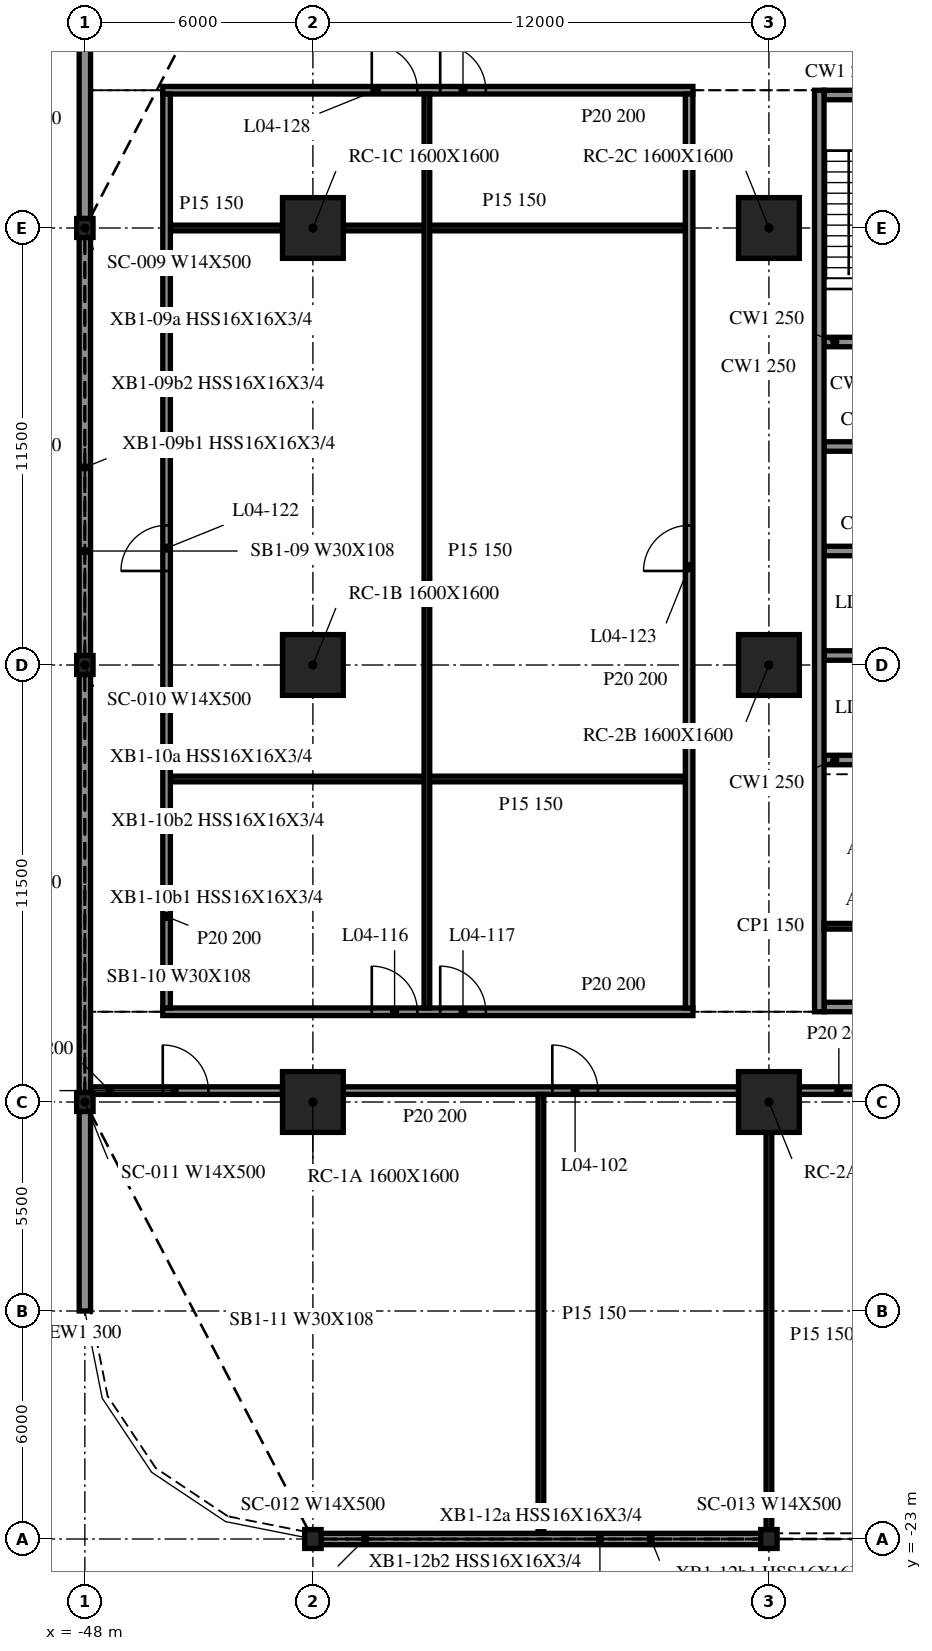
"""IFC4 building model, lengths in metres.
Left out: names, types, materials, properties, quantities, classifications, styles, units other than length and angle.
Written with IfcOpenShell. Run it as: python <this file> out.ifc"""

import sys

from ifc_helpers import new_model, si_unit, direction, frame, frame_2d, origin, origin_2d, place, context, subcontext, project, spatial, rectangle, i_section, extrude, element, fill, save


model = new_model("IFC4")
c1 = context("Model", 3, precision=1e-05, world=origin(), true_north=direction((0.0, 1.0)))
c2 = subcontext(c1, "Body", "Model", "MODEL_VIEW")
j1 = project(units=[si_unit("LENGTHUNIT", "METRE"), si_unit("PLANEANGLEUNIT", "RADIAN")], contexts=[c1])
p1 = place(None, origin())
s1 = spatial("IfcSite", under=j1, at=p1, CompositionType="ELEMENT")
p2 = place(p1, origin())
s2 = spatial("IfcBuilding", under=s1, at=p2, CompositionType="ELEMENT")
p3 = place(p2, frame((0.0, 0.0, 20.1)))
s3 = spatial("IfcBuildingStorey", under=s2, at=p3, CompositionType="ELEMENT", Elevation=20.1)
for number, where, z_axis, x_axis in (
    (1, (-42.0, -11.5, -0.34), (0.0, 0.0, 1.0), (1.0, 0.0, 0.0)),
    (2, (-42.0, 0.0, -0.34), (0.0, 0.0, 1.0), (1.0, 0.0, 0.0)),
    (3, (-42.0, 11.5, -0.34), (0.0, 0.0, 1.0), (1.0, 0.0, 0.0)),
    (4, (-30.0, -11.5, -0.34), (0.0, 0.0, 1.0), (1.0, 0.0, 0.0)),
    (5, (-30.0, 0.0, -0.34), (0.0, 0.0, 1.0), (1.0, 0.0, 0.0)),
    (6, (-30.0, 11.5, -0.34), (0.0, 0.0, 1.0), (1.0, 0.0, 0.0)),
):
    element("IfcColumn", number, at=place(p3, frame(where, z_axis=z_axis, x_axis=x_axis)), inside=s3, PredefinedType="COLUMN", context=c2, shape_type="SweptSolid", body=[
        extrude(rectangle(XDim=1.6, YDim=1.6, at=origin_2d()), origin(), (0.0, 0.0, 1.0), 4.3),
    ])
for number, where, z_axis, x_axis in (
    (7, (-48.0, 11.5, -0.34), (0.0, 0.0, 1.0), (1.0, 0.0, 0.0)),
    (8, (-48.0, 0.0, -0.34), (0.0, 0.0, 1.0), (1.0, 0.0, 0.0)),
    (9, (-48.0, -11.5, -0.34), (0.0, 0.0, 1.0), (1.0, 0.0, 0.0)),
    (10, (-42.0, -23.0, -0.34), (0.0, 0.0, 1.0), (1.0, 0.0, 0.0)),
    (11, (-30.0, -23.0, -0.34), (0.0, 0.0, 1.0), (1.0, 0.0, 0.0)),
):
    element("IfcColumn", number, at=place(p3, frame(where, z_axis=z_axis, x_axis=x_axis)), inside=s3, PredefinedType="COLUMN", context=c2, shape_type="SweptSolid", body=[
        extrude(i_section(OverallWidth=0.432, OverallDepth=0.498, WebThickness=0.056, FlangeThickness=0.089, at=origin_2d()), origin(), (0.0, 0.0, 1.0), 4.3),
    ])
p4 = place(p3, frame((-48.0, 17.0, 0.0), z_axis=(0.0, 0.0, 1.0), x_axis=(0.0, -1.0, 0.0)))
e12 = element("IfcWall", 12, at=p4, inside=s3, PredefinedType="NOTDEFINED", context=c2, shape_type="SweptSolid", body=[
    extrude(rectangle(XDim=5.251, YDim=0.3, at=frame_2d((2.625, 0.0))), origin(), (0.0, 0.0, 1.0), 3.203),
])
for number, where, z_axis, x_axis in (
    (13, (-48.0, 11.251, 0.0), (0.0, 0.0, 1.0), (0.0, -1.0, 0.0)),
    (14, (-48.0, -0.249, 0.0), (0.0, 0.0, 1.0), (0.0, -1.0, 0.0)),
):
    element("IfcWall", number, at=place(p3, frame(where, z_axis=z_axis, x_axis=x_axis)), inside=s3, PredefinedType="NOTDEFINED", context=c2, shape_type="SweptSolid", body=[
        extrude(rectangle(XDim=11.002, YDim=0.3, at=frame_2d((5.501, 0.0))), origin(), (0.0, 0.0, 1.0), 3.203),
    ])
p5 = place(p3, frame((-48.0, -11.749, 0.0), z_axis=(0.0, 0.0, 1.0), x_axis=(0.0, -1.0, 0.0)))
e15 = element("IfcWall", 15, at=p5, inside=s3, PredefinedType="NOTDEFINED", context=c2, shape_type="SweptSolid", body=[
    extrude(rectangle(XDim=5.251, YDim=0.3, at=frame_2d((2.625, 0.0))), origin(), (0.0, 0.0, 1.0), 3.203),
])
p6 = place(p3, frame((-41.972, -23.0, 0.0), z_axis=(0.0, 0.0, 1.0), x_axis=(1.0, 0.0, 0.0)))
e16 = element("IfcWall", 16, at=p6, inside=s3, PredefinedType="NOTDEFINED", context=c2, shape_type="SweptSolid", body=[
    extrude(rectangle(XDim=11.944, YDim=0.3, at=frame_2d((5.972, 0.0))), origin(), (0.0, 0.0, 1.0), 3.203),
])
p7 = place(p3, frame((-28.675, 15.125, 0.0), z_axis=(0.0, 0.0, 1.0), x_axis=(0.0, -1.0, 0.0)))
e17 = element("IfcWall", 17, at=p7, inside=s3, PredefinedType="SOLIDWALL", context=c2, shape_type="SweptSolid", body=[
    extrude(rectangle(XDim=24.25, YDim=0.25, at=frame_2d((12.125, 0.0))), origin(), (0.0, 0.0, 1.0), 3.96),
])
p8 = place(p3, frame((-19.45, -9.0, 0.0), z_axis=(0.0, 0.0, 1.0), x_axis=(-1.0, 0.0, 0.0)))
e18 = element("IfcWall", 18, at=p8, inside=s3, PredefinedType="SOLIDWALL", context=c2, shape_type="SweptSolid", body=[
    extrude(rectangle(XDim=9.1, YDim=0.25, at=frame_2d((4.55, 0.0))), origin(), (0.0, 0.0, 1.0), 3.96),
])
p9 = place(p8, frame((3.65, 0.0, 0.0)))
e19 = element("IfcOpeningElement", 19, at=p9, cuts=e18, PredefinedType="OPENING", context=c2, shape_type="SweptSolid", body=[
    extrude(rectangle(XDim=1.8, YDim=2.1, at=frame_2d((0.9, 1.05))), frame((0.0, 0.135, 0.0), z_axis=(0.0, -1.0, 0.0), x_axis=(1.0, 0.0, 0.0)), (0.0, 0.0, 1.0), 0.27),
])
p10 = place(p3, frame((-28.55, 15.0, 0.0), z_axis=(0.0, 0.0, 1.0), x_axis=(1.0, 0.0, 0.0)))
e20 = element("IfcWall", 20, at=p10, inside=s3, PredefinedType="SOLIDWALL", context=c2, shape_type="SweptSolid", body=[
    extrude(rectangle(XDim=9.1, YDim=0.25, at=frame_2d((4.55, 0.0))), origin(), (0.0, 0.0, 1.0), 3.96),
])
p11 = place(p10, frame((3.65, 0.0, 0.0)))
e21 = element("IfcOpeningElement", 21, at=p11, cuts=e20, PredefinedType="OPENING", context=c2, shape_type="SweptSolid", body=[
    extrude(rectangle(XDim=1.8, YDim=2.1, at=frame_2d((0.9, 1.05))), frame((0.0, 0.135, 0.0), z_axis=(0.0, -1.0, 0.0), x_axis=(1.0, 0.0, 0.0)), (0.0, 0.0, 1.0), 0.27),
])
for number, where, z_axis, x_axis in (
    (22, (-28.55, -2.5, 0.0), (0.0, 0.0, 1.0), (1.0, 0.0, 0.0)),
    (23, (-28.55, 0.25, 0.0), (0.0, 0.0, 1.0), (1.0, 0.0, 0.0)),
    (24, (-28.55, 3.0, 0.0), (0.0, 0.0, 1.0), (1.0, 0.0, 0.0)),
    (25, (-28.55, 5.75, 0.0), (0.0, 0.0, 1.0), (1.0, 0.0, 0.0)),
    (26, (-28.55, 8.5, 0.0), (0.0, 0.0, 1.0), (1.0, 0.0, 0.0)),
):
    element("IfcWall", number, at=place(p3, frame(where, z_axis=z_axis, x_axis=x_axis)), inside=s3, PredefinedType="SOLIDWALL", context=c2, shape_type="SweptSolid", body=[
        extrude(rectangle(XDim=2.85, YDim=0.25, at=frame_2d((1.425, 0.0))), origin(), (0.0, 0.0, 1.0), 3.96),
    ])
p12 = place(p3, frame((-28.55, -6.875, 0.0), z_axis=(0.0, 0.0, 1.0), x_axis=(1.0, 0.0, 0.0)))
e27 = element("IfcWall", 27, at=p12, inside=s3, PredefinedType="PARTITIONING", context=c2, shape_type="SweptSolid", body=[
    extrude(rectangle(XDim=2.85, YDim=0.15, at=frame_2d((1.425, 0.0))), origin(), (0.0, 0.0, 1.0), 3.96),
])
p13 = place(p3, frame((-47.85, -11.2, 0.0), z_axis=(0.0, 0.0, 1.0), x_axis=(1.0, 0.0, 0.0)))
e28 = element("IfcWall", 28, at=p13, inside=s3, PredefinedType="PARTITIONING", context=c2, shape_type="SweptSolid", body=[
    extrude(rectangle(XDim=5.05, YDim=0.2, at=frame_2d((2.525, 0.0))), origin(), (0.0, 0.0, 1.0), 3.96),
])
p14 = place(p13, frame((1.9, 0.0, 0.0)))
e29 = element("IfcOpeningElement", 29, at=p14, cuts=e28, PredefinedType="OPENING", context=c2, shape_type="SweptSolid", body=[
    extrude(rectangle(XDim=1.2, YDim=2.1, at=frame_2d((0.6, 1.05))), frame((0.0, 0.11, 0.0), z_axis=(0.0, -1.0, 0.0), x_axis=(1.0, 0.0, 0.0)), (0.0, 0.0, 1.0), 0.22),
])
p15 = place(p3, frame((-41.2, -11.2, 0.0), z_axis=(0.0, 0.0, 1.0), x_axis=(1.0, 0.0, 0.0)))
e30 = element("IfcWall", 30, at=p15, inside=s3, PredefinedType="PARTITIONING", context=c2, shape_type="SweptSolid", body=[
    extrude(rectangle(XDim=10.4, YDim=0.2, at=frame_2d((5.2, 0.0))), origin(), (0.0, 0.0, 1.0), 3.96),
])
p16 = place(p15, frame((5.5, 0.0, 0.0)))
e31 = element("IfcOpeningElement", 31, at=p16, cuts=e30, PredefinedType="OPENING", context=c2, shape_type="SweptSolid", body=[
    extrude(rectangle(XDim=1.2, YDim=2.1, at=frame_2d((0.6, 1.05))), frame((0.0, 0.11, 0.0), z_axis=(0.0, -1.0, 0.0), x_axis=(1.0, 0.0, 0.0)), (0.0, 0.0, 1.0), 0.22),
])
p17 = place(p3, frame((-29.2, -11.2, 0.0), z_axis=(0.0, 0.0, 1.0), x_axis=(1.0, 0.0, 0.0)))
e32 = element("IfcWall", 32, at=p17, inside=s3, PredefinedType="PARTITIONING", context=c2, shape_type="SweptSolid", body=[
    extrude(rectangle(XDim=10.4, YDim=0.2, at=frame_2d((5.2, 0.0))), origin(), (0.0, 0.0, 1.0), 3.96),
])
p18 = place(p17, frame((3.7, 0.0, 0.0)))
e33 = element("IfcOpeningElement", 33, at=p18, cuts=e32, PredefinedType="OPENING", context=c2, shape_type="SweptSolid", body=[
    extrude(rectangle(XDim=1.2, YDim=2.1, at=frame_2d((0.6, 1.05))), frame((0.0, 0.11, 0.0), z_axis=(0.0, -1.0, 0.0), x_axis=(1.0, 0.0, 0.0)), (0.0, 0.0, 1.0), 0.22),
])
p19 = place(p17, frame((5.5, 0.0, 0.0)))
e34 = element("IfcOpeningElement", 34, at=p19, cuts=e32, PredefinedType="OPENING", context=c2, shape_type="SweptSolid", body=[
    extrude(rectangle(XDim=1.2, YDim=2.1, at=frame_2d((0.6, 1.05))), frame((0.0, 0.11, 0.0), z_axis=(0.0, -1.0, 0.0), x_axis=(1.0, 0.0, 0.0)), (0.0, 0.0, 1.0), 0.22),
])
p20 = place(p17, frame((8.5, 0.0, 0.0)))
e35 = element("IfcOpeningElement", 35, at=p20, cuts=e32, PredefinedType="OPENING", context=c2, shape_type="SweptSolid", body=[
    extrude(rectangle(XDim=1.0, YDim=2.1, at=frame_2d((0.5, 1.05))), frame((0.0, 0.11, 0.0), z_axis=(0.0, -1.0, 0.0), x_axis=(1.0, 0.0, 0.0)), (0.0, 0.0, 1.0), 0.22),
])
p21 = place(p3, frame((-45.95, -9.125, 0.0), z_axis=(0.0, 0.0, 1.0), x_axis=(1.0, 0.0, 0.0)))
e36 = element("IfcWall", 36, at=p21, inside=s3, PredefinedType="PARTITIONING", context=c2, shape_type="SweptSolid", body=[
    extrude(rectangle(XDim=13.95, YDim=0.2, at=frame_2d((6.975, 0.0))), origin(), (0.0, 0.0, 1.0), 3.96),
])
p22 = place(p21, frame((5.5, 0.0, 0.0)))
e37 = element("IfcOpeningElement", 37, at=p22, cuts=e36, PredefinedType="OPENING", context=c2, shape_type="SweptSolid", body=[
    extrude(rectangle(XDim=1.2, YDim=2.1, at=frame_2d((0.6, 1.05))), frame((0.0, 0.11, 0.0), z_axis=(0.0, -1.0, 0.0), x_axis=(1.0, 0.0, 0.0)), (0.0, 0.0, 1.0), 0.22),
])
p23 = place(p21, frame((7.3, 0.0, 0.0)))
e38 = element("IfcOpeningElement", 38, at=p23, cuts=e36, PredefinedType="OPENING", context=c2, shape_type="SweptSolid", body=[
    extrude(rectangle(XDim=1.2, YDim=2.1, at=frame_2d((0.6, 1.05))), frame((0.0, 0.11, 0.0), z_axis=(0.0, -1.0, 0.0), x_axis=(1.0, 0.0, 0.0)), (0.0, 0.0, 1.0), 0.22),
])
p24 = place(p3, frame((-45.75, -3.0, 0.0), z_axis=(0.0, 0.0, 1.0), x_axis=(1.0, 0.0, 0.0)))
e39 = element("IfcWall", 39, at=p24, inside=s3, PredefinedType="PARTITIONING", context=c2, shape_type="SweptSolid", body=[
    extrude(rectangle(XDim=13.55, YDim=0.15, at=frame_2d((6.775, 0.0))), origin(), (0.0, 0.0, 1.0), 3.96),
])
p25 = place(p3, frame((-45.75, 11.5, 0.0), z_axis=(0.0, 0.0, 1.0), x_axis=(1.0, 0.0, 0.0)))
e40 = element("IfcWall", 40, at=p25, inside=s3, PredefinedType="PARTITIONING", context=c2, shape_type="SweptSolid", body=[
    extrude(rectangle(XDim=2.95, YDim=0.15, at=frame_2d((1.475, 0.0))), origin(), (0.0, 0.0, 1.0), 3.96),
])
p26 = place(p3, frame((-41.2, 11.5, 0.0), z_axis=(0.0, 0.0, 1.0), x_axis=(1.0, 0.0, 0.0)))
e41 = element("IfcWall", 41, at=p26, inside=s3, PredefinedType="PARTITIONING", context=c2, shape_type="SweptSolid", body=[
    extrude(rectangle(XDim=9.0, YDim=0.15, at=frame_2d((4.5, 0.0))), origin(), (0.0, 0.0, 1.0), 3.96),
])
p27 = place(p3, frame((-45.95, 15.125, 0.0), z_axis=(0.0, 0.0, 1.0), x_axis=(1.0, 0.0, 0.0)))
e42 = element("IfcWall", 42, at=p27, inside=s3, PredefinedType="PARTITIONING", context=c2, shape_type="SweptSolid", body=[
    extrude(rectangle(XDim=13.95, YDim=0.2, at=frame_2d((6.975, 0.0))), origin(), (0.0, 0.0, 1.0), 3.96),
])
p28 = place(p27, frame((5.5, 0.0, 0.0)))
e43 = element("IfcOpeningElement", 43, at=p28, cuts=e42, PredefinedType="OPENING", context=c2, shape_type="SweptSolid", body=[
    extrude(rectangle(XDim=1.2, YDim=2.1, at=frame_2d((0.6, 1.05))), frame((0.0, 0.11, 0.0), z_axis=(0.0, -1.0, 0.0), x_axis=(1.0, 0.0, 0.0)), (0.0, 0.0, 1.0), 0.22),
])
p29 = place(p27, frame((7.3, 0.0, 0.0)))
e44 = element("IfcOpeningElement", 44, at=p29, cuts=e42, PredefinedType="OPENING", context=c2, shape_type="SweptSolid", body=[
    extrude(rectangle(XDim=1.2, YDim=2.1, at=frame_2d((0.6, 1.05))), frame((0.0, 0.11, 0.0), z_axis=(0.0, -1.0, 0.0), x_axis=(1.0, 0.0, 0.0)), (0.0, 0.0, 1.0), 0.22),
])
p30 = place(p3, frame((-45.85, -9.025, 0.0), z_axis=(0.0, 0.0, 1.0), x_axis=(0.0, 1.0, 0.0)))
e45 = element("IfcWall", 45, at=p30, inside=s3, PredefinedType="PARTITIONING", context=c2, shape_type="SweptSolid", body=[
    extrude(rectangle(XDim=24.05, YDim=0.2, at=frame_2d((12.025, 0.0))), origin(), (0.0, 0.0, 1.0), 3.96),
])
p31 = place(p30, frame((11.5, 0.0, 0.0)))
e46 = element("IfcOpeningElement", 46, at=p31, cuts=e45, PredefinedType="OPENING", context=c2, shape_type="SweptSolid", body=[
    extrude(rectangle(XDim=1.2, YDim=2.1, at=frame_2d((0.6, 1.05))), frame((0.0, 0.11, 0.0), z_axis=(0.0, -1.0, 0.0), x_axis=(1.0, 0.0, 0.0)), (0.0, 0.0, 1.0), 0.22),
])
p32 = place(p3, frame((-39.0, -9.025, 0.0), z_axis=(0.0, 0.0, 1.0), x_axis=(0.0, 1.0, 0.0)))
e47 = element("IfcWall", 47, at=p32, inside=s3, PredefinedType="PARTITIONING", context=c2, shape_type="SweptSolid", body=[
    extrude(rectangle(XDim=24.05, YDim=0.15, at=frame_2d((12.025, 0.0))), origin(), (0.0, 0.0, 1.0), 3.96),
])
p33 = place(p3, frame((-36.0, -22.85, 0.0), z_axis=(0.0, 0.0, 1.0), x_axis=(0.0, 1.0, 0.0)))
e48 = element("IfcWall", 48, at=p33, inside=s3, PredefinedType="PARTITIONING", context=c2, shape_type="SweptSolid", body=[
    extrude(rectangle(XDim=11.55, YDim=0.15, at=frame_2d((5.775, 0.0))), origin(), (0.0, 0.0, 1.0), 3.96),
])
p34 = place(p3, frame((-32.1, -9.025, 0.0), z_axis=(0.0, 0.0, 1.0), x_axis=(0.0, 1.0, 0.0)))
e49 = element("IfcWall", 49, at=p34, inside=s3, PredefinedType="PARTITIONING", context=c2, shape_type="SweptSolid", body=[
    extrude(rectangle(XDim=24.05, YDim=0.2, at=frame_2d((12.025, 0.0))), origin(), (0.0, 0.0, 1.0), 3.96),
])
p35 = place(p34, frame((11.5, 0.0, 0.0)))
e50 = element("IfcOpeningElement", 50, at=p35, cuts=e49, PredefinedType="OPENING", context=c2, shape_type="SweptSolid", body=[
    extrude(rectangle(XDim=1.2, YDim=2.1, at=frame_2d((0.6, 1.05))), frame((0.0, 0.11, 0.0), z_axis=(0.0, -1.0, 0.0), x_axis=(1.0, 0.0, 0.0)), (0.0, 0.0, 1.0), 0.22),
])
p36 = place(p3, frame((-30.0, -22.975, 0.0), z_axis=(0.0, 0.0, 1.0), x_axis=(0.0, 1.0, 0.0)))
e51 = element("IfcWall", 51, at=p36, inside=s3, PredefinedType="PARTITIONING", context=c2, shape_type="SweptSolid", body=[
    extrude(rectangle(XDim=10.675, YDim=0.15, at=frame_2d((5.337, 0.0))), origin(), (0.0, 0.0, 1.0), 3.96),
])
p37 = place(p14, origin())
e52 = element("IfcDoor", 52, at=p37, inside=s3, OperationType="SINGLE_SWING_RIGHT", PredefinedType="DOOR", context=c2, shape_type="SweptSolid", body=[
    extrude(rectangle(XDim=1.2, YDim=2.1, at=frame_2d((0.6, 1.05))), frame((0.0, 0.025, 0.0), z_axis=(0.0, -1.0, 0.0), x_axis=(1.0, 0.0, 0.0)), (0.0, 0.0, 1.0), 0.05),
])
fill(e29, e52)
p38 = place(p16, origin())
e53 = element("IfcDoor", 53, at=p38, inside=s3, OperationType="SINGLE_SWING_LEFT", PredefinedType="DOOR", context=c2, shape_type="SweptSolid", body=[
    extrude(rectangle(XDim=1.2, YDim=2.1, at=frame_2d((0.6, 1.05))), frame((0.0, 0.025, 0.0), z_axis=(0.0, -1.0, 0.0), x_axis=(1.0, 0.0, 0.0)), (0.0, 0.0, 1.0), 0.05),
])
fill(e31, e53)
p39 = place(p22, origin())
e54 = element("IfcDoor", 54, at=p39, inside=s3, OperationType="SINGLE_SWING_LEFT", PredefinedType="DOOR", context=c2, shape_type="SweptSolid", body=[
    extrude(rectangle(XDim=1.2, YDim=2.1, at=frame_2d((0.6, 1.05))), frame((0.0, 0.025, 0.0), z_axis=(0.0, -1.0, 0.0), x_axis=(1.0, 0.0, 0.0)), (0.0, 0.0, 1.0), 0.05),
])
fill(e37, e54)
p40 = place(p23, origin())
e55 = element("IfcDoor", 55, at=p40, inside=s3, OperationType="SINGLE_SWING_RIGHT", PredefinedType="DOOR", context=c2, shape_type="SweptSolid", body=[
    extrude(rectangle(XDim=1.2, YDim=2.1, at=frame_2d((0.6, 1.05))), frame((0.0, 0.025, 0.0), z_axis=(0.0, -1.0, 0.0), x_axis=(1.0, 0.0, 0.0)), (0.0, 0.0, 1.0), 0.05),
])
fill(e38, e55)
p41 = place(p31, origin())
e56 = element("IfcDoor", 56, at=p41, inside=s3, OperationType="SINGLE_SWING_LEFT", PredefinedType="DOOR", context=c2, shape_type="SweptSolid", body=[
    extrude(rectangle(XDim=1.2, YDim=2.1, at=frame_2d((0.6, 1.05))), frame((0.0, 0.025, 0.0), z_axis=(0.0, -1.0, 0.0), x_axis=(1.0, 0.0, 0.0)), (0.0, 0.0, 1.0), 0.05),
])
fill(e46, e56)
p42 = place(p35, origin())
e57 = element("IfcDoor", 57, at=p42, inside=s3, OperationType="SINGLE_SWING_RIGHT", PredefinedType="DOOR", context=c2, shape_type="SweptSolid", body=[
    extrude(rectangle(XDim=1.2, YDim=2.1, at=frame_2d((0.6, 1.05))), frame((0.0, 0.025, 0.0), z_axis=(0.0, -1.0, 0.0), x_axis=(1.0, 0.0, 0.0)), (0.0, 0.0, 1.0), 0.05),
])
fill(e50, e57)
p43 = place(p28, origin())
e58 = element("IfcDoor", 58, at=p43, inside=s3, OperationType="SINGLE_SWING_RIGHT", PredefinedType="DOOR", context=c2, shape_type="SweptSolid", body=[
    extrude(rectangle(XDim=1.2, YDim=2.1, at=frame_2d((0.6, 1.05))), frame((0.0, 0.025, 0.0), z_axis=(0.0, -1.0, 0.0), x_axis=(1.0, 0.0, 0.0)), (0.0, 0.0, 1.0), 0.05),
])
fill(e43, e58)
p44 = place(p29, origin())
e59 = element("IfcDoor", 59, at=p44, inside=s3, OperationType="SINGLE_SWING_LEFT", PredefinedType="DOOR", context=c2, shape_type="SweptSolid", body=[
    extrude(rectangle(XDim=1.2, YDim=2.1, at=frame_2d((0.6, 1.05))), frame((0.0, 0.025, 0.0), z_axis=(0.0, -1.0, 0.0), x_axis=(1.0, 0.0, 0.0)), (0.0, 0.0, 1.0), 0.05),
])
fill(e44, e59)
save(model, sys.argv[1])
